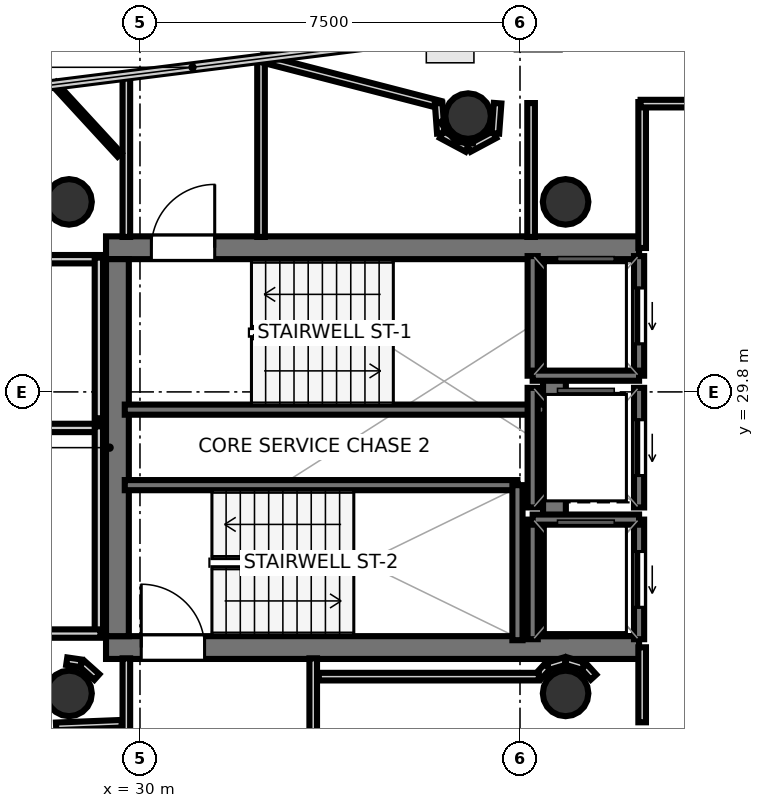
"""IFC4 building model, lengths in metres.
Left out: names, types, materials, properties, quantities, classifications, styles, units other than length and angle.
Written with IfcOpenShell. Run it as: python <this file> out.ifc"""

import sys

from ifc_helpers import new_model, si_unit, direction, frame, frame_2d, origin, origin_2d, place, context, subcontext, project, spatial, rectangle, hollow_circle, extrude, element, fill, save


model = new_model("IFC4")
c1 = context("Model", 3, precision=1e-05, world=origin(), true_north=direction((0.0, 1.0)))
c2 = subcontext(c1, "Body", "Model", "MODEL_VIEW")
j1 = project(units=[si_unit("LENGTHUNIT", "METRE"), si_unit("PLANEANGLEUNIT", "RADIAN")], contexts=[c1])
p1 = place(None, origin())
s1 = spatial("IfcSite", under=j1, at=p1, CompositionType="ELEMENT")
p2 = place(p1, origin())
s2 = spatial("IfcBuilding", under=s1, at=p2, CompositionType="ELEMENT")
p3 = place(p2, frame((0.0, 0.0, 284.3)))
s3 = spatial("IfcBuildingStorey", under=s2, at=p3, CompositionType="ELEMENT", Elevation=284.3)
p4 = place(p3, frame((29.33, 32.645, 0.0), z_axis=(0.0, 0.0, 1.0), x_axis=(1.0, 0.0, 0.0)))
e1 = element("IfcWall", 1, at=p4, inside=s3, PredefinedType="SHEAR", context=c2, shape_type="SweptSolid", body=[
    extrude(rectangle(XDim=10.52, YDim=0.45, at=frame_2d((5.26, 0.0))), origin(), (0.0, 0.0, 1.0), 3.52),
])
p5 = place(p4, frame((0.895, 0.0, 0.0)))
e2 = element("IfcOpeningElement", 2, at=p5, cuts=e1, PredefinedType="OPENING", context=c2, shape_type="SweptSolid", body=[
    extrude(rectangle(XDim=1.25, YDim=2.15, at=frame_2d((0.625, 1.075))), frame((0.0, 0.235, 0.0), z_axis=(0.0, -1.0, 0.0), x_axis=(1.0, 0.0, 0.0)), (0.0, 0.0, 1.0), 0.47),
])
p6 = place(p3, frame((29.33, 24.755, 0.0), z_axis=(0.0, 0.0, 1.0), x_axis=(1.0, 0.0, 0.0)))
e3 = element("IfcWall", 3, at=p6, inside=s3, PredefinedType="SHEAR", context=c2, shape_type="SweptSolid", body=[
    extrude(rectangle(XDim=10.52, YDim=0.45, at=frame_2d((5.26, 0.0))), origin(), (0.0, 0.0, 1.0), 3.52),
])
p7 = place(p6, frame((0.695, 0.0, 0.0)))
e4 = element("IfcOpeningElement", 4, at=p7, cuts=e3, PredefinedType="OPENING", context=c2, shape_type="SweptSolid", body=[
    extrude(rectangle(XDim=1.25, YDim=2.15, at=frame_2d((0.625, 1.075))), frame((0.0, 0.235, 0.0), z_axis=(0.0, -1.0, 0.0), x_axis=(1.0, 0.0, 0.0)), (0.0, 0.0, 1.0), 0.47),
])
for number, where, z_axis, x_axis in (
    (5, (29.555, 24.98, 0.0), (0.0, 0.0, 1.0), (0.0, 1.0, 0.0)),
    (6, (38.18, 24.98, 0.0), (0.0, 0.0, 1.0), (0.0, 1.0, 0.0)),
):
    element("IfcWall", number, at=place(p3, frame(where, z_axis=z_axis, x_axis=x_axis)), inside=s3, PredefinedType="SHEAR", context=c2, shape_type="SweptSolid", body=[
        extrude(rectangle(XDim=7.44, YDim=0.45, at=frame_2d((3.72, 0.0))), origin(), (0.0, 0.0, 1.0), 3.52),
    ])
for number, where, z_axis, x_axis in (
    (7, (28.6, 33.55, 0.0), (0.0, 0.0, 1.0), (1.0, 0.0, 0.0)),
    (8, (28.6, 23.85, 0.0), (0.0, 0.0, 1.0), (1.0, 0.0, 0.0)),
    (9, (38.4, 33.55, 0.0), (0.0, 0.0, 1.0), (1.0, 0.0, 0.0)),
    (10, (38.4, 23.85, 0.0), (0.0, 0.0, 1.0), (1.0, 0.0, 0.0)),
    (11, (36.476, 35.243, 0.0), (0.0, 0.0, 1.0), (1.0, 0.0, 0.0)),
):
    element("IfcColumn", number, at=place(p3, frame(where, z_axis=z_axis, x_axis=x_axis)), inside=s3, PredefinedType="COLUMN", context=c2, shape_type="SweptSolid", body=[
        extrude(hollow_circle(Radius=0.45, WallThickness=0.025, at=origin_2d()), origin(), (0.0, 0.0, 1.0), 3.7),
    ])
p8 = place(p3, frame((29.7, 29.45, 0.0), z_axis=(0.0, 0.0, 1.0), x_axis=(1.0, 0.0, 0.0)))
e12 = element("IfcWall", 12, at=p8, inside=s3, PredefinedType="SOLIDWALL", context=c2, shape_type="SweptSolid", body=[
    extrude(rectangle(XDim=8.3, YDim=0.2, at=frame_2d((4.15, 0.0))), origin(), (0.0, 0.0, 1.0), 3.52),
])
p9 = place(p3, frame((29.7, 27.96, 0.0), z_axis=(0.0, 0.0, 1.0), x_axis=(1.0, 0.0, 0.0)))
e13 = element("IfcWall", 13, at=p9, inside=s3, PredefinedType="SOLIDWALL", context=c2, shape_type="SweptSolid", body=[
    extrude(rectangle(XDim=7.75, YDim=0.2, at=frame_2d((3.875, 0.0))), origin(), (0.0, 0.0, 1.0), 3.52),
])
p10 = place(p3, frame((37.45, 24.9, 0.0), z_axis=(0.0, 0.0, 1.0), x_axis=(0.0, 1.0, 0.0)))
e14 = element("IfcWall", 14, at=p10, inside=s3, PredefinedType="SOLIDWALL", context=c2, shape_type="SweptSolid", body=[
    extrude(rectangle(XDim=3.06, YDim=0.2, at=frame_2d((1.53, 0.0))), origin(), (0.0, 0.0, 1.0), 3.52),
])
p11 = place(p3, frame((39.85, 30.12, 0.0), z_axis=(0.0, 0.0, 1.0), x_axis=(0.0, 1.0, 0.0)))
e15 = element("IfcWall", 15, at=p11, inside=s3, PredefinedType="SOLIDWALL", context=c2, shape_type="SweptSolid", body=[
    extrude(rectangle(XDim=2.36, YDim=0.2, at=frame_2d((1.18, 0.0))), origin(), (0.0, 0.0, 1.0), 3.52),
])
p12 = place(p11, frame((0.63, 0.0, 0.0)))
e16 = element("IfcOpeningElement", 16, at=p12, cuts=e15, PredefinedType="OPENING", context=c2, shape_type="SweptSolid", body=[
    extrude(rectangle(XDim=1.1, YDim=2.15, at=frame_2d((0.55, 1.075))), frame((0.0, 0.11, 0.0), z_axis=(0.0, -1.0, 0.0), x_axis=(1.0, 0.0, 0.0)), (0.0, 0.0, 1.0), 0.22),
])
p13 = place(p3, frame((37.75, 30.12, 0.0), z_axis=(0.0, 0.0, 1.0), x_axis=(0.0, 1.0, 0.0)))
e17 = element("IfcWall", 17, at=p13, inside=s3, PredefinedType="SOLIDWALL", context=c2, shape_type="SweptSolid", body=[
    extrude(rectangle(XDim=2.36, YDim=0.2, at=frame_2d((1.18, 0.0))), origin(), (0.0, 0.0, 1.0), 3.52),
])
p14 = place(p3, frame((37.75, 30.12, 0.0), z_axis=(0.0, 0.0, 1.0), x_axis=(1.0, 0.0, 0.0)))
e18 = element("IfcWall", 18, at=p14, inside=s3, PredefinedType="SOLIDWALL", context=c2, shape_type="SweptSolid", body=[
    extrude(rectangle(XDim=2.1, YDim=0.2, at=frame_2d((1.05, 0.0))), origin(), (0.0, 0.0, 1.0), 3.52),
])
p15 = place(p3, frame((39.85, 24.92, 0.0), z_axis=(0.0, 0.0, 1.0), x_axis=(0.0, 1.0, 0.0)))
e19 = element("IfcWall", 19, at=p15, inside=s3, PredefinedType="SOLIDWALL", context=c2, shape_type="SweptSolid", body=[
    extrude(rectangle(XDim=2.36, YDim=0.2, at=frame_2d((1.18, 0.0))), origin(), (0.0, 0.0, 1.0), 3.52),
])
p16 = place(p15, frame((0.63, 0.0, 0.0)))
e20 = element("IfcOpeningElement", 20, at=p16, cuts=e19, PredefinedType="OPENING", context=c2, shape_type="SweptSolid", body=[
    extrude(rectangle(XDim=1.1, YDim=2.15, at=frame_2d((0.55, 1.075))), frame((0.0, 0.11, 0.0), z_axis=(0.0, -1.0, 0.0), x_axis=(1.0, 0.0, 0.0)), (0.0, 0.0, 1.0), 0.22),
])
p17 = place(p3, frame((37.75, 24.92, 0.0), z_axis=(0.0, 0.0, 1.0), x_axis=(0.0, 1.0, 0.0)))
e21 = element("IfcWall", 21, at=p17, inside=s3, PredefinedType="SOLIDWALL", context=c2, shape_type="SweptSolid", body=[
    extrude(rectangle(XDim=2.36, YDim=0.2, at=frame_2d((1.18, 0.0))), origin(), (0.0, 0.0, 1.0), 3.52),
])
p18 = place(p3, frame((37.75, 27.28, 0.0), z_axis=(0.0, 0.0, 1.0), x_axis=(1.0, 0.0, 0.0)))
e22 = element("IfcWall", 22, at=p18, inside=s3, PredefinedType="SOLIDWALL", context=c2, shape_type="SweptSolid", body=[
    extrude(rectangle(XDim=2.1, YDim=0.2, at=frame_2d((1.05, 0.0))), origin(), (0.0, 0.0, 1.0), 3.52),
])
p19 = place(p3, frame((39.85, 27.52, 0.0), z_axis=(0.0, 0.0, 1.0), x_axis=(0.0, 1.0, 0.0)))
e23 = element("IfcWall", 23, at=p19, inside=s3, PredefinedType="SOLIDWALL", context=c2, shape_type="SweptSolid", body=[
    extrude(rectangle(XDim=2.36, YDim=0.2, at=frame_2d((1.18, 0.0))), origin(), (0.0, 0.0, 1.0), 3.52),
])
p20 = place(p19, frame((0.63, 0.0, 0.0)))
e24 = element("IfcOpeningElement", 24, at=p20, cuts=e23, PredefinedType="OPENING", context=c2, shape_type="SweptSolid", body=[
    extrude(rectangle(XDim=1.1, YDim=2.15, at=frame_2d((0.55, 1.075))), frame((0.0, 0.11, 0.0), z_axis=(0.0, -1.0, 0.0), x_axis=(1.0, 0.0, 0.0)), (0.0, 0.0, 1.0), 0.22),
])
p21 = place(p3, frame((37.75, 27.52, 0.0), z_axis=(0.0, 0.0, 1.0), x_axis=(0.0, 1.0, 0.0)))
e25 = element("IfcWall", 25, at=p21, inside=s3, PredefinedType="SOLIDWALL", context=c2, shape_type="SweptSolid", body=[
    extrude(rectangle(XDim=2.36, YDim=0.2, at=frame_2d((1.18, 0.0))), origin(), (0.0, 0.0, 1.0), 3.52),
])
p22 = place(p3, frame((29.731, 32.858, 0.0), z_axis=(0.0, 0.0, 1.0), x_axis=(0.0, 1.0, 0.0)))
e26 = element("IfcWall", 26, at=p22, inside=s3, PredefinedType="PARTITIONING", context=c2, shape_type="SweptSolid", body=[
    extrude(rectangle(XDim=3.204, YDim=0.15, at=frame_2d((1.602, 0.0))), origin(), (0.0, 0.0, 1.0), 2.84),
])
p23 = place(p3, frame((32.389, 36.396, 0.0), z_axis=(0.0, 0.0, 1.0), x_axis=(0.0, -1.0, 0.0)))
e27 = element("IfcWall", 27, at=p23, inside=s3, PredefinedType="PARTITIONING", context=c2, shape_type="SweptSolid", body=[
    extrude(rectangle(XDim=3.538, YDim=0.15, at=frame_2d((1.769, 0.0))), origin(), (0.0, 0.0, 1.0), 2.84),
])
for number, where, z_axis, x_axis in (
    (28, (29.731, 21.85, 0.0), (0.0, 0.0, 1.0), (0.0, 1.0, 0.0)),
    (29, (33.419, 24.542, 0.0), (0.0, 0.0, 1.0), (0.0, -1.0, 0.0)),
):
    element("IfcWall", number, at=place(p3, frame(where, z_axis=z_axis, x_axis=x_axis)), inside=s3, PredefinedType="PARTITIONING", context=c2, shape_type="SweptSolid", body=[
        extrude(rectangle(XDim=2.692, YDim=0.15, at=frame_2d((1.346, 0.0))), origin(), (0.0, 0.0, 1.0), 2.84),
    ])
p24 = place(p3, frame((39.911, 23.28, 0.0), z_axis=(0.0, 0.0, 1.0), x_axis=(0.0, 1.0, 0.0)))
e30 = element("IfcWall", 30, at=p24, inside=s3, PredefinedType="PARTITIONING", context=c2, shape_type="SweptSolid", body=[
    extrude(rectangle(XDim=1.48, YDim=0.15, at=frame_2d((0.74, 0.0))), origin(), (0.0, 0.0, 1.0), 2.84),
])
p25 = place(p3, frame((39.911, 32.64, 0.0), z_axis=(0.0, 0.0, 1.0), x_axis=(0.0, 1.0, 0.0)))
e31 = element("IfcWall", 31, at=p25, inside=s3, PredefinedType="PARTITIONING", context=c2, shape_type="SweptSolid", body=[
    extrude(rectangle(XDim=2.88, YDim=0.15, at=frame_2d((1.44, 0.0))), origin(), (0.0, 0.0, 1.0), 2.84),
])
p26 = place(p3, frame((39.88, 35.489, 0.0), z_axis=(0.0, 0.0, 1.0), x_axis=(1.0, 0.0, 0.0)))
e32 = element("IfcWall", 32, at=p26, inside=s3, PredefinedType="PARTITIONING", context=c2, shape_type="SweptSolid", body=[
    extrude(rectangle(XDim=1.48, YDim=0.15, at=frame_2d((0.74, 0.0))), origin(), (0.0, 0.0, 1.0), 2.84),
])
p27 = place(p3, frame((27.72, 29.089, 0.0), z_axis=(0.0, 0.0, 1.0), x_axis=(1.0, 0.0, 0.0)))
e33 = element("IfcWall", 33, at=p27, inside=s3, PredefinedType="PLUMBINGWALL", context=c2, shape_type="SweptSolid", body=[
    extrude(rectangle(XDim=1.5, YDim=0.165, at=frame_2d((0.75, 0.0))), origin(), (0.0, 0.0, 1.0), 2.84),
])
p28 = place(p3, frame((29.189, 29.12, 0.0), z_axis=(0.0, 0.0, 1.0), x_axis=(0.0, -1.0, 0.0)))
e34 = element("IfcWall", 34, at=p28, inside=s3, PredefinedType="PLUMBINGWALL", context=c2, shape_type="SweptSolid", body=[
    extrude(rectangle(XDim=4.12, YDim=0.165, at=frame_2d((2.06, 0.0))), origin(), (0.0, 0.0, 1.0), 2.84),
])
for number, where, z_axis, x_axis in (
    (35, (29.22, 25.031, 0.0), (0.0, 0.0, 1.0), (-1.0, 0.0, 0.0)),
    (36, (27.72, 32.419, 0.0), (0.0, 0.0, 1.0), (1.0, 0.0, 0.0)),
):
    element("IfcWall", number, at=place(p3, frame(where, z_axis=z_axis, x_axis=x_axis)), inside=s3, PredefinedType="PLUMBINGWALL", context=c2, shape_type="SweptSolid", body=[
        extrude(rectangle(XDim=1.5, YDim=0.165, at=frame_2d((0.75, 0.0))), origin(), (0.0, 0.0, 1.0), 2.84),
    ])
p29 = place(p3, frame((29.189, 32.45, 0.0), z_axis=(0.0, 0.0, 1.0), x_axis=(0.0, -1.0, 0.0)))
e37 = element("IfcWall", 37, at=p29, inside=s3, PredefinedType="PLUMBINGWALL", context=c2, shape_type="SweptSolid", body=[
    extrude(rectangle(XDim=3.17, YDim=0.165, at=frame_2d((1.585, 0.0))), origin(), (0.0, 0.0, 1.0), 2.84),
])
p30 = place(p3, frame((38.951, 24.171, 0.0), z_axis=(0.0, 0.0, 1.0), x_axis=(-0.674186852077, 0.738560822469, 0.0)))
e38 = element("IfcWall", 38, at=p30, inside=s3, PredefinedType="PARTITIONING", context=c2, shape_type="SweptSolid", body=[
    extrude(rectangle(XDim=0.281, YDim=0.15, at=frame_2d((0.14, 0.0))), origin(), (0.0, 0.0, 1.0), 2.84),
])
p31 = place(p3, frame((38.748, 24.387, 0.0), z_axis=(0.0, 0.0, 1.0), x_axis=(-0.956948991291, 0.290256142171, 0.0)))
e39 = element("IfcWall", 39, at=p31, inside=s3, PredefinedType="PARTITIONING", context=c2, shape_type="SweptSolid", body=[
    extrude(rectangle(XDim=0.354, YDim=0.15, at=frame_2d((0.177, 0.0))), origin(), (0.0, 0.0, 1.0), 2.84),
])
p32 = place(p3, frame((38.391, 24.49, 0.0), z_axis=(0.0, 0.0, 1.0), x_axis=(-0.957007018611, -0.290064762301, 0.0)))
e40 = element("IfcWall", 40, at=p32, inside=s3, PredefinedType="PARTITIONING", context=c2, shape_type="SweptSolid", body=[
    extrude(rectangle(XDim=0.354, YDim=0.15, at=frame_2d((0.177, 0.0))), origin(), (0.0, 0.0, 1.0), 2.84),
])
p33 = place(p3, frame((38.038, 24.378, 0.0), z_axis=(0.0, 0.0, 1.0), x_axis=(-0.673658387955, -0.739042878551, 0.0)))
e41 = element("IfcWall", 41, at=p33, inside=s3, PredefinedType="PARTITIONING", context=c2, shape_type="SweptSolid", body=[
    extrude(rectangle(XDim=0.246, YDim=0.15, at=frame_2d((0.123, 0.0))), origin(), (0.0, 0.0, 1.0), 2.84),
])
p34 = place(p3, frame((37.872, 24.181, 0.0), z_axis=(0.0, 0.0, 1.0), x_axis=(-1.0, 0.0, 0.0)))
e42 = element("IfcWall", 42, at=p34, inside=s3, PredefinedType="PARTITIONING", context=c2, shape_type="SweptSolid", body=[
    extrude(rectangle(XDim=4.342, YDim=0.15, at=frame_2d((2.171, 0.0))), origin(), (0.0, 0.0, 1.0), 2.84),
])
p35 = place(p3, frame((29.149, 24.173, 0.0), z_axis=(0.0, 0.0, 1.0), x_axis=(-0.745225165416, 0.666812906917, 0.0)))
e43 = element("IfcWall", 43, at=p35, inside=s3, PredefinedType="PARTITIONING", context=c2, shape_type="SweptSolid", body=[
    extrude(rectangle(XDim=0.396, YDim=0.15, at=frame_2d((0.198, 0.0))), origin(), (0.0, 0.0, 1.0), 2.84),
])
p36 = place(p3, frame((28.838, 24.444, 0.0), z_axis=(0.0, 0.0, 1.0), x_axis=(-0.989449148305, 0.144880581578, 0.0)))
e44 = element("IfcWall", 44, at=p36, inside=s3, PredefinedType="PARTITIONING", context=c2, shape_type="SweptSolid", body=[
    extrude(rectangle(XDim=0.286, YDim=0.15, at=frame_2d((0.143, 0.0))), origin(), (0.0, 0.0, 1.0), 2.84),
])
p37 = place(p3, frame((32.406, 36.378, 0.0), z_axis=(0.0, 0.0, 1.0), x_axis=(0.968212286396, -0.250129903194, 0.0)))
e45 = element("IfcWall", 45, at=p37, inside=s3, PredefinedType="PARTITIONING", context=c2, shape_type="SweptSolid", body=[
    extrude(rectangle(XDim=3.635, YDim=0.15, at=frame_2d((1.817, 0.0))), origin(), (0.0, 0.0, 1.0), 2.84),
])
p38 = place(p3, frame((35.894, 35.498, 0.0), z_axis=(0.0, 0.0, 1.0), x_axis=(0.07354059826, -0.997292224179, 0.0)))
e46 = element("IfcWall", 46, at=p38, inside=s3, PredefinedType="PARTITIONING", context=c2, shape_type="SweptSolid", body=[
    extrude(rectangle(XDim=0.598, YDim=0.15, at=frame_2d((0.299, 0.0))), origin(), (0.0, 0.0, 1.0), 2.84),
])
for number, where, z_axis, x_axis in (
    (47, (35.954, 34.877, 0.0), (0.0, 0.0, 1.0), (0.882, -0.471, 0.0)),
    (48, (36.49, 34.606, 0.0), (0.0, 0.0, 1.0), (0.882, 0.471, 0.0)),
):
    element("IfcWall", number, at=place(p3, frame(where, z_axis=z_axis, x_axis=x_axis)), inside=s3, PredefinedType="PARTITIONING", context=c2, shape_type="SweptSolid", body=[
        extrude(rectangle(XDim=0.575, YDim=0.15, at=frame_2d((0.288, 0.0))), origin(), (0.0, 0.0, 1.0), 2.84),
    ])
p39 = place(p3, frame((37.014, 34.902, 0.0), z_axis=(0.0, 0.0, 1.0), x_axis=(0.073134230676, 0.997322106595, 0.0)))
e49 = element("IfcWall", 49, at=p39, inside=s3, PredefinedType="PARTITIONING", context=c2, shape_type="SweptSolid", body=[
    extrude(rectangle(XDim=0.598, YDim=0.15, at=frame_2d((0.299, 0.0))), origin(), (0.0, 0.0, 1.0), 2.84),
])
p40 = place(p3, frame((37.719, 35.5, 0.0), z_axis=(0.0, 0.0, 1.0), x_axis=(0.0, -1.0, 0.0)))
e50 = element("IfcWall", 50, at=p40, inside=s3, PredefinedType="PARTITIONING", context=c2, shape_type="SweptSolid", body=[
    extrude(rectangle(XDim=2.642, YDim=0.15, at=frame_2d((1.321, 0.0))), origin(), (0.0, 0.0, 1.0), 2.84),
])
p41 = place(p3, frame((28.345, 23.2, 0.0), z_axis=(0.0, 0.0, 1.0), x_axis=(0.999216536924, 0.039576664043, 0.0)))
e51 = element("IfcWall", 51, at=p41, inside=s3, PredefinedType="PARTITIONING", context=c2, shape_type="SweptSolid", body=[
    extrude(rectangle(XDim=1.295, YDim=0.15, at=frame_2d((0.648, 0.0))), origin(), (0.0, 0.0, 1.0), 2.84),
])
p42 = place(p3, frame((36.579, 34.754, 0.0), z_axis=(0.0, 0.0, 1.0), x_axis=(-0.994396027142, 0.105719161958, 0.0)))
e52 = element("IfcWall", 52, at=p42, inside=s3, PredefinedType="PARTITIONING", context=c2, shape_type="SweptSolid", body=[
    extrude(rectangle(XDim=0.307, YDim=0.105, at=frame_2d((0.154, 0.0))), origin(), (0.0, 0.0, 1.0), 2.84),
])
p43 = place(p3, frame((36.294, 34.775, 0.0), z_axis=(0.0, 0.0, 1.0), x_axis=(-0.628803993136, 0.777563848321, 0.0)))
e53 = element("IfcWall", 53, at=p43, inside=s3, PredefinedType="PARTITIONING", context=c2, shape_type="SweptSolid", body=[
    extrude(rectangle(XDim=0.499, YDim=0.14, at=frame_2d((0.25, 0.0))), origin(), (0.0, 0.0, 1.0), 2.84),
])
p44 = place(p3, frame((28.307, 35.879, 0.0), z_axis=(0.0, 0.0, 1.0), x_axis=(0.677289660451, -0.735716464303, 0.0)))
e54 = element("IfcWall", 54, at=p44, inside=s3, PredefinedType="PARTITIONING", context=c2, shape_type="SweptSolid", body=[
    extrude(rectangle(XDim=1.906, YDim=0.105, at=frame_2d((0.953, 0.0))), origin(), (0.0, 0.0, 1.0), 2.84),
])
p45 = place(p5, origin())
e55 = element("IfcDoor", 55, at=p45, inside=s3, OperationType="SINGLE_SWING_RIGHT", PredefinedType="DOOR", context=c2, shape_type="SweptSolid", body=[
    extrude(rectangle(XDim=1.25, YDim=2.15, at=frame_2d((0.625, 1.075))), frame((0.0, 0.025, 0.0), z_axis=(0.0, -1.0, 0.0), x_axis=(1.0, 0.0, 0.0)), (0.0, 0.0, 1.0), 0.05),
])
fill(e2, e55)
p46 = place(p7, origin())
e56 = element("IfcDoor", 56, at=p46, inside=s3, OperationType="SINGLE_SWING_LEFT", PredefinedType="DOOR", context=c2, shape_type="SweptSolid", body=[
    extrude(rectangle(XDim=1.25, YDim=2.15, at=frame_2d((0.625, 1.075))), frame((0.0, 0.025, 0.0), z_axis=(0.0, -1.0, 0.0), x_axis=(1.0, 0.0, 0.0)), (0.0, 0.0, 1.0), 0.05),
])
fill(e4, e56)
p47 = place(p12, origin())
e57 = element("IfcDoor", 57, at=p47, inside=s3, OperationType="SLIDING_TO_LEFT", PredefinedType="DOOR", context=c2, shape_type="SweptSolid", body=[
    extrude(rectangle(XDim=1.1, YDim=2.15, at=frame_2d((0.55, 1.075))), frame((0.0, 0.025, 0.0), z_axis=(0.0, -1.0, 0.0), x_axis=(1.0, 0.0, 0.0)), (0.0, 0.0, 1.0), 0.05),
])
fill(e16, e57)
p48 = place(p16, origin())
e58 = element("IfcDoor", 58, at=p48, inside=s3, OperationType="SLIDING_TO_LEFT", PredefinedType="DOOR", context=c2, shape_type="SweptSolid", body=[
    extrude(rectangle(XDim=1.1, YDim=2.15, at=frame_2d((0.55, 1.075))), frame((0.0, 0.025, 0.0), z_axis=(0.0, -1.0, 0.0), x_axis=(1.0, 0.0, 0.0)), (0.0, 0.0, 1.0), 0.05),
])
fill(e20, e58)
p49 = place(p20, origin())
e59 = element("IfcDoor", 59, at=p49, inside=s3, OperationType="SLIDING_TO_LEFT", PredefinedType="DOOR", context=c2, shape_type="SweptSolid", body=[
    extrude(rectangle(XDim=1.1, YDim=2.15, at=frame_2d((0.55, 1.075))), frame((0.0, 0.025, 0.0), z_axis=(0.0, -1.0, 0.0), x_axis=(1.0, 0.0, 0.0)), (0.0, 0.0, 1.0), 0.05),
])
fill(e24, e59)
save(model, sys.argv[1])
